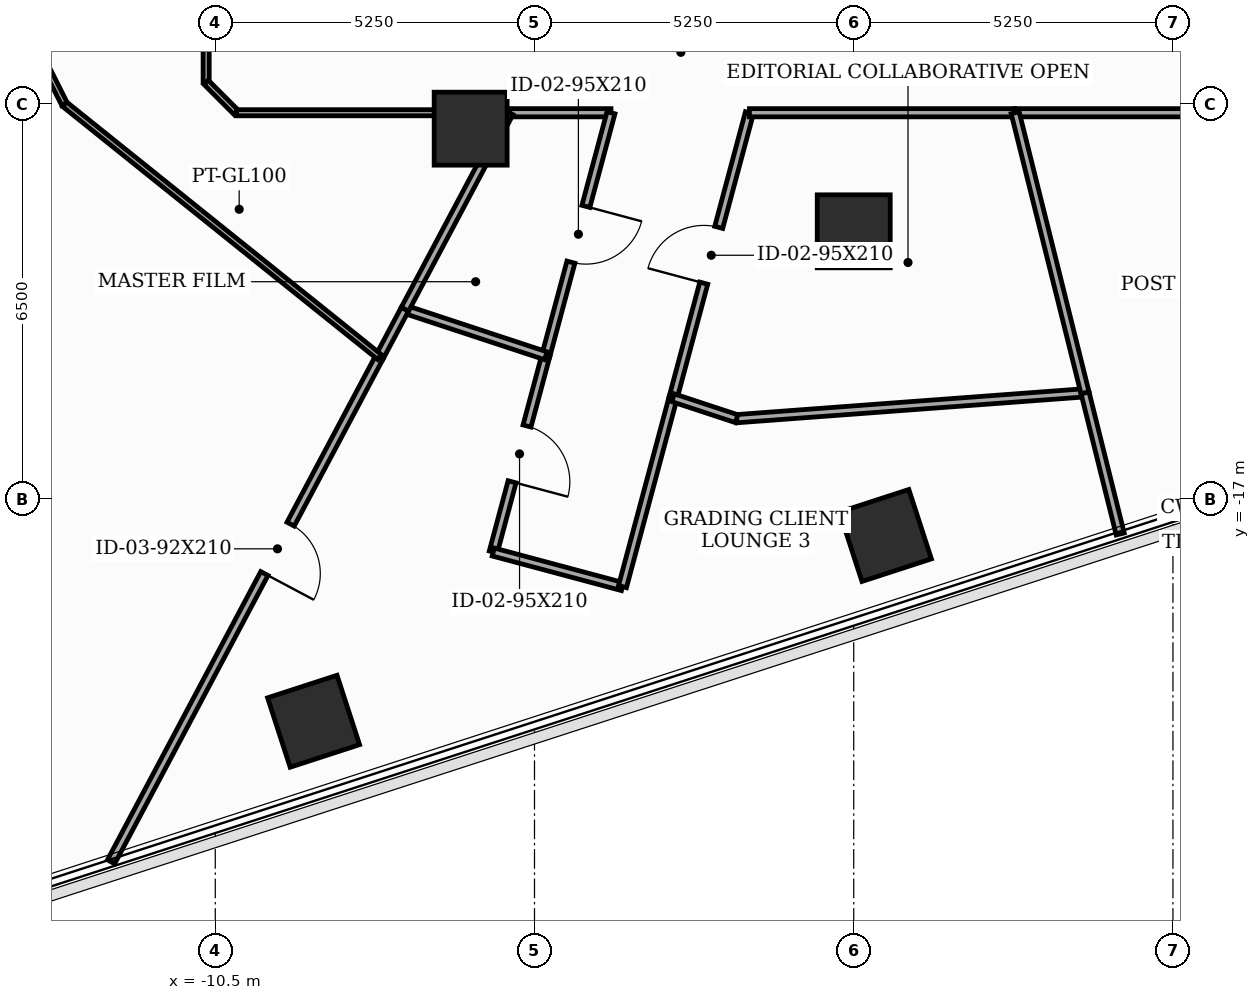
"""IFC4 building model, lengths in metres.
Left out: names, types, materials, properties, quantities, classifications, styles, units other than length and angle.
Written with IfcOpenShell. Run it as: python <this file> out.ifc"""

import sys

from ifc_helpers import new_model, si_unit, direction, frame, frame_2d, origin, origin_2d, place, context, subcontext, project, spatial, rectangle, extrude, element, fill, save


model = new_model("IFC4")
c1 = context("Model", 3, precision=1e-05, world=origin(), true_north=direction((0.0, 1.0)))
c2 = subcontext(c1, "Body", "Model", "MODEL_VIEW")
j1 = project(units=[si_unit("LENGTHUNIT", "METRE"), si_unit("PLANEANGLEUNIT", "RADIAN")], contexts=[c1])
p1 = place(None, origin())
s1 = spatial("IfcSite", under=j1, at=p1, CompositionType="ELEMENT")
p2 = place(p1, origin())
s2 = spatial("IfcBuilding", under=s1, at=p2, CompositionType="ELEMENT")
p3 = place(p2, frame((0.0, 0.0, 94.0)))
s3 = spatial("IfcBuildingStorey", under=s2, at=p3, CompositionType="ELEMENT", Elevation=94.0)
for number, where, z_axis, x_axis in (
    (1, (-6.3, -10.912, 0.0), (0.0, 0.0, 1.0), (1.0, 0.0, 0.0)),
    (2, (0.0, -12.6, 0.0), (0.0, 0.0, 1.0), (1.0, 0.0, 0.0)),
    (3, (-8.883, -20.658, 0.0), (0.0, 0.0, 1.0), (0.951, 0.309, 0.0)),
    (4, (0.521, -17.603, 0.0), (0.0, 0.0, 1.0), (0.951, 0.309, 0.0)),
):
    element("IfcColumn", number, at=place(p3, frame(where, z_axis=z_axis, x_axis=x_axis)), inside=s3, PredefinedType="COLUMN", context=c2, shape_type="SweptSolid", body=[
        extrude(rectangle(XDim=1.2, YDim=1.2, at=origin_2d()), origin(), (0.0, 0.0, 1.0), 3.7),
    ])
p4 = place(p3, frame((-5.663, -10.65, 0.0), z_axis=(0.0, 0.0, 1.0), x_axis=(1.0, 0.0, 0.0)))
e5 = element("IfcWall", 5, at=p4, inside=s3, PredefinedType="PARTITIONING", context=c2, shape_type="SweptSolid", body=[
    extrude(rectangle(XDim=1.671, YDim=0.135, at=frame_2d((0.835, 0.0))), origin(), (0.0, 0.0, 1.0), 3.5),
])
p5 = place(p3, frame((-3.992, -10.65, 0.0), z_axis=(0.0, 0.0, 1.0), x_axis=(-0.259046685972, -0.96586480135, 0.0)))
e6 = element("IfcWall", 6, at=p5, inside=s3, PredefinedType="PARTITIONING", context=c2, shape_type="SweptSolid", body=[
    extrude(rectangle(XDim=4.138, YDim=0.135, at=frame_2d((2.069, 0.0))), origin(), (0.0, 0.0, 1.0), 2.785),
])
p6 = place(p5, frame((1.594, 0.0, 0.0)))
e7 = element("IfcOpeningElement", 7, at=p6, cuts=e6, PredefinedType="OPENING", context=c2, shape_type="SweptSolid", body=[
    extrude(rectangle(XDim=0.95, YDim=2.1, at=frame_2d((0.475, 1.05))), frame((0.0, 0.077, 0.0), z_axis=(0.0, -1.0, 0.0), x_axis=(1.0, 0.0, 0.0)), (0.0, 0.0, 1.0), 0.155),
])
p7 = place(p3, frame((-5.064, -14.647, 0.0), z_axis=(0.0, 0.0, 1.0), x_axis=(-0.258558355083, -0.965995640268, 0.0)))
e8 = element("IfcWall", 8, at=p7, inside=s3, PredefinedType="PARTITIONING", context=c2, shape_type="SweptSolid", body=[
    extrude(rectangle(XDim=3.342, YDim=0.135, at=frame_2d((1.671, 0.0))), origin(), (0.0, 0.0, 1.0), 3.125),
])
p8 = place(p7, frame((1.196, 0.0, 0.0)))
e9 = element("IfcOpeningElement", 9, at=p8, cuts=e8, PredefinedType="OPENING", context=c2, shape_type="SweptSolid", body=[
    extrude(rectangle(XDim=0.95, YDim=2.1, at=frame_2d((0.475, 1.05))), frame((0.0, 0.077, 0.0), z_axis=(0.0, -1.0, 0.0), x_axis=(1.0, 0.0, 0.0)), (0.0, 0.0, 1.0), 0.155),
])
p9 = place(p3, frame((-5.928, -17.875, 0.0), z_axis=(0.0, 0.0, 1.0), x_axis=(0.965959937537, -0.258691706618, 0.0)))
e10 = element("IfcWall", 10, at=p9, inside=s3, PredefinedType="PARTITIONING", context=c2, shape_type="SweptSolid", body=[
    extrude(rectangle(XDim=2.2, YDim=0.135, at=frame_2d((1.1, 0.0))), origin(), (0.0, 0.0, 1.0), 3.5),
])
p10 = place(p3, frame((-3.803, -18.444, 0.0), z_axis=(0.0, 0.0, 1.0), x_axis=(0.258739880159, 0.965947034995, 0.0)))
e11 = element("IfcWall", 11, at=p10, inside=s3, PredefinedType="PARTITIONING", context=c2, shape_type="SweptSolid", body=[
    extrude(rectangle(XDim=3.216, YDim=0.135, at=frame_2d((1.608, 0.0))), origin(), (0.0, 0.0, 1.0), 3.125),
])
p11 = place(p3, frame((-2.971, -15.338, 0.0), z_axis=(0.0, 0.0, 1.0), x_axis=(0.258764582319, 0.965940417902, 0.0)))
e12 = element("IfcWall", 12, at=p11, inside=s3, PredefinedType="PARTITIONING", context=c2, shape_type="SweptSolid", body=[
    extrude(rectangle(XDim=4.853, YDim=0.135, at=frame_2d((2.427, 0.0))), origin(), (0.0, 0.0, 1.0), 2.785),
])
p12 = place(p11, frame((1.952, 0.0, 0.0)))
e13 = element("IfcOpeningElement", 13, at=p12, cuts=e12, PredefinedType="OPENING", context=c2, shape_type="SweptSolid", body=[
    extrude(rectangle(XDim=0.95, YDim=2.1, at=frame_2d((0.475, 1.05))), frame((0.0, 0.077, 0.0), z_axis=(0.0, -1.0, 0.0), x_axis=(1.0, 0.0, 0.0)), (0.0, 0.0, 1.0), 0.155),
])
p13 = place(p3, frame((-1.715, -10.65, 0.0), z_axis=(0.0, 0.0, 1.0), x_axis=(1.0, 0.0, 0.0)))
e14 = element("IfcWall", 14, at=p13, inside=s3, PredefinedType="PARTITIONING", context=c2, shape_type="SweptSolid", body=[
    extrude(rectangle(XDim=4.37, YDim=0.135, at=frame_2d((2.185, 0.0))), origin(), (0.0, 0.0, 1.0), 2.785),
])
p14 = place(p3, frame((-10.65, -4.85, 0.0), z_axis=(0.0, 0.0, 1.0), x_axis=(0.0, -1.0, 0.0)))
e15 = element("IfcWall", 15, at=p14, inside=s3, PredefinedType="MOVABLE", context=c2, shape_type="SweptSolid", body=[
    extrude(rectangle(XDim=5.3, YDim=0.1, at=frame_2d((2.65, 0.0))), origin(), (0.0, 0.0, 1.0), 2.785),
])
p15 = place(p14, frame((3.765, 0.0, 0.0)))
e16 = element("IfcOpeningElement", 16, at=p15, cuts=e15, PredefinedType="OPENING", context=c2, shape_type="SweptSolid", body=[
    extrude(rectangle(XDim=0.95, YDim=2.1, at=frame_2d((0.475, 1.05))), frame((0.0, 0.06, 0.0), z_axis=(0.0, -1.0, 0.0), x_axis=(1.0, 0.0, 0.0)), (0.0, 0.0, 1.0), 0.12),
])
p16 = place(p3, frame((-10.65, -10.15, 0.0), z_axis=(0.0, 0.0, 1.0), x_axis=(0.707106781187, -0.707106781187, 0.0)))
e17 = element("IfcWall", 17, at=p16, inside=s3, PredefinedType="MOVABLE", context=c2, shape_type="SweptSolid", body=[
    extrude(rectangle(XDim=0.707, YDim=0.1, at=frame_2d((0.354, 0.0))), origin(), (0.0, 0.0, 1.0), 3.5),
])
p17 = place(p3, frame((-10.15, -10.65, 0.0), z_axis=(0.0, 0.0, 1.0), x_axis=(1.0, 0.0, 0.0)))
e18 = element("IfcWall", 18, at=p17, inside=s3, PredefinedType="MOVABLE", context=c2, shape_type="SweptSolid", body=[
    extrude(rectangle(XDim=4.487, YDim=0.1, at=frame_2d((2.243, 0.0))), origin(), (0.0, 0.0, 1.0), 2.785),
])
p18 = place(p3, frame((2.655, -10.65, 0.0), z_axis=(0.0, 0.0, 1.0), x_axis=(1.0, 0.0, 0.0)))
e19 = element("IfcWall", 19, at=p18, inside=s3, PredefinedType="PARTITIONING", context=c2, shape_type="SweptSolid", body=[
    extrude(rectangle(XDim=7.495, YDim=0.135, at=frame_2d((3.748, 0.0))), origin(), (0.0, 0.0, 1.0), 2.785),
])
p19 = place(p3, frame((-7.382, -13.883, 0.0), z_axis=(0.0, 0.0, 1.0), x_axis=(0.949758055829, -0.312985040199, 0.0)))
e20 = element("IfcWall", 20, at=p19, inside=s3, PredefinedType="PARTITIONING", context=c2, shape_type="SweptSolid", body=[
    extrude(rectangle(XDim=2.441, YDim=0.135, at=frame_2d((1.22, 0.0))), origin(), (0.0, 0.0, 1.0), 2.785),
])
p20 = place(p3, frame((-5.663, -10.65, 0.0), z_axis=(0.0, 0.0, 1.0), x_axis=(-0.469449315633, -0.882959421521, 0.0)))
e21 = element("IfcWall", 21, at=p20, inside=s3, PredefinedType="PARTITIONING", context=c2, shape_type="SweptSolid", body=[
    extrude(rectangle(XDim=3.662, YDim=0.135, at=frame_2d((1.831, 0.0))), origin(), (0.0, 0.0, 1.0), 2.785),
])
p21 = place(p3, frame((3.804, -15.256, 0.0), z_axis=(0.0, 0.0, 1.0), x_axis=(-0.99725056907, -0.07410332307, 0.0)))
e22 = element("IfcWall", 22, at=p21, inside=s3, PredefinedType="PARTITIONING", context=c2, shape_type="SweptSolid", body=[
    extrude(rectangle(XDim=5.746, YDim=0.135, at=frame_2d((2.873, 0.0))), origin(), (0.0, 0.0, 1.0), 2.785),
])
p22 = place(p3, frame((-1.926, -15.682, 0.0), z_axis=(0.0, 0.0, 1.0), x_axis=(-0.949852955326, 0.312696919171, 0.0)))
e23 = element("IfcWall", 23, at=p22, inside=s3, PredefinedType="PARTITIONING", context=c2, shape_type="SweptSolid", body=[
    extrude(rectangle(XDim=1.1, YDim=0.135, at=frame_2d((0.55, 0.0))), origin(), (0.0, 0.0, 1.0), 3.125),
])
p23 = place(p3, frame((-7.382, -13.883, 0.0), z_axis=(0.0, 0.0, 1.0), x_axis=(-0.469617532863, -0.882869963714, 0.0)))
e24 = element("IfcWall", 24, at=p23, inside=s3, PredefinedType="PARTITIONING", context=c2, shape_type="SweptSolid", body=[
    extrude(rectangle(XDim=0.888, YDim=0.135, at=frame_2d((0.444, 0.0))), origin(), (0.0, 0.0, 1.0), 2.785),
])
p24 = place(p3, frame((-7.799, -14.667, 0.0), z_axis=(0.0, 0.0, 1.0), x_axis=(-0.469441180524, -0.882963746723, 0.0)))
e25 = element("IfcWall", 25, at=p24, inside=s3, PredefinedType="PARTITIONING", context=c2, shape_type="SweptSolid", body=[
    extrude(rectangle(XDim=9.404, YDim=0.135, at=frame_2d((4.702, 0.0))), origin(), (0.0, 0.0, 1.0), 2.935),
])
p25 = place(p24, frame((3.114, 0.0, 0.0)))
e26 = element("IfcOpeningElement", 26, at=p25, cuts=e25, PredefinedType="OPENING", context=c2, shape_type="SweptSolid", body=[
    extrude(rectangle(XDim=0.92, YDim=2.1, at=frame_2d((0.46, 1.05))), frame((0.0, 0.077, 0.0), z_axis=(0.0, -1.0, 0.0), x_axis=(1.0, 0.0, 0.0)), (0.0, 0.0, 1.0), 0.155),
])
p26 = place(p3, frame((4.383, -17.578, 0.0), z_axis=(0.0, 0.0, 1.0), x_axis=(-0.241887449135, 0.970304314095, 0.0)))
e27 = element("IfcWall", 27, at=p26, inside=s3, PredefinedType="PARTITIONING", context=c2, shape_type="SweptSolid", body=[
    extrude(rectangle(XDim=2.393, YDim=0.135, at=frame_2d((1.197, 0.0))), origin(), (0.0, 0.0, 1.0), 2.935),
])
p27 = place(p3, frame((3.804, -15.256, 0.0), z_axis=(0.0, 0.0, 1.0), x_axis=(-0.24201527033, 0.970272440569, 0.0)))
e28 = element("IfcWall", 28, at=p27, inside=s3, PredefinedType="PARTITIONING", context=c2, shape_type="SweptSolid", body=[
    extrude(rectangle(XDim=4.747, YDim=0.135, at=frame_2d((2.374, 0.0))), origin(), (0.0, 0.0, 1.0), 2.785),
])
p28 = place(p3, frame((-15.968, -4.579, 0.0), z_axis=(0.0, 0.0, 1.0), x_axis=(0.450166439867, -0.892944665933, 0.0)))
e29 = element("IfcWall", 29, at=p28, inside=s3, PredefinedType="MOVABLE", context=c2, shape_type="SweptSolid", body=[
    extrude(rectangle(XDim=6.642, YDim=0.1, at=frame_2d((3.321, 0.0))), origin(), (0.0, 0.0, 1.0), 2.785),
])
p29 = place(p3, frame((-12.978, -10.51, 0.0), z_axis=(0.0, 0.0, 1.0), x_axis=(0.779852762203, -0.625962993543, 0.0)))
e30 = element("IfcWall", 30, at=p29, inside=s3, PredefinedType="MOVABLE", context=c2, shape_type="SweptSolid", body=[
    extrude(rectangle(XDim=6.641, YDim=0.1, at=frame_2d((3.32, 0.0))), origin(), (0.0, 0.0, 1.0), 3.5),
])
p30 = place(p6, origin())
e31 = element("IfcDoor", 31, at=p30, inside=s3, OperationType="SINGLE_SWING_LEFT", PredefinedType="DOOR", context=c2, shape_type="SweptSolid", body=[
    extrude(rectangle(XDim=0.95, YDim=2.1, at=frame_2d((0.475, 1.05))), frame((0.0, 0.025, 0.0), z_axis=(0.0, -1.0, 0.0), x_axis=(1.0, 0.0, 0.0)), (0.0, 0.0, 1.0), 0.05),
])
fill(e7, e31)
p31 = place(p8, origin())
e32 = element("IfcDoor", 32, at=p31, inside=s3, OperationType="SINGLE_SWING_RIGHT", PredefinedType="DOOR", context=c2, shape_type="SweptSolid", body=[
    extrude(rectangle(XDim=0.95, YDim=2.1, at=frame_2d((0.475, 1.05))), frame((0.0, 0.025, 0.0), z_axis=(0.0, -1.0, 0.0), x_axis=(1.0, 0.0, 0.0)), (0.0, 0.0, 1.0), 0.05),
])
fill(e9, e32)
p32 = place(p12, origin())
e33 = element("IfcDoor", 33, at=p32, inside=s3, OperationType="SINGLE_SWING_LEFT", PredefinedType="DOOR", context=c2, shape_type="SweptSolid", body=[
    extrude(rectangle(XDim=0.95, YDim=2.1, at=frame_2d((0.475, 1.05))), frame((0.0, 0.025, 0.0), z_axis=(0.0, -1.0, 0.0), x_axis=(1.0, 0.0, 0.0)), (0.0, 0.0, 1.0), 0.05),
])
fill(e13, e33)
p33 = place(p25, origin())
e34 = element("IfcDoor", 34, at=p33, inside=s3, OperationType="SINGLE_SWING_RIGHT", PredefinedType="DOOR", context=c2, shape_type="SweptSolid", body=[
    extrude(rectangle(XDim=0.92, YDim=2.1, at=frame_2d((0.46, 1.05))), frame((0.0, 0.025, 0.0), z_axis=(0.0, -1.0, 0.0), x_axis=(1.0, 0.0, 0.0)), (0.0, 0.0, 1.0), 0.05),
])
fill(e26, e34)
save(model, sys.argv[1])
